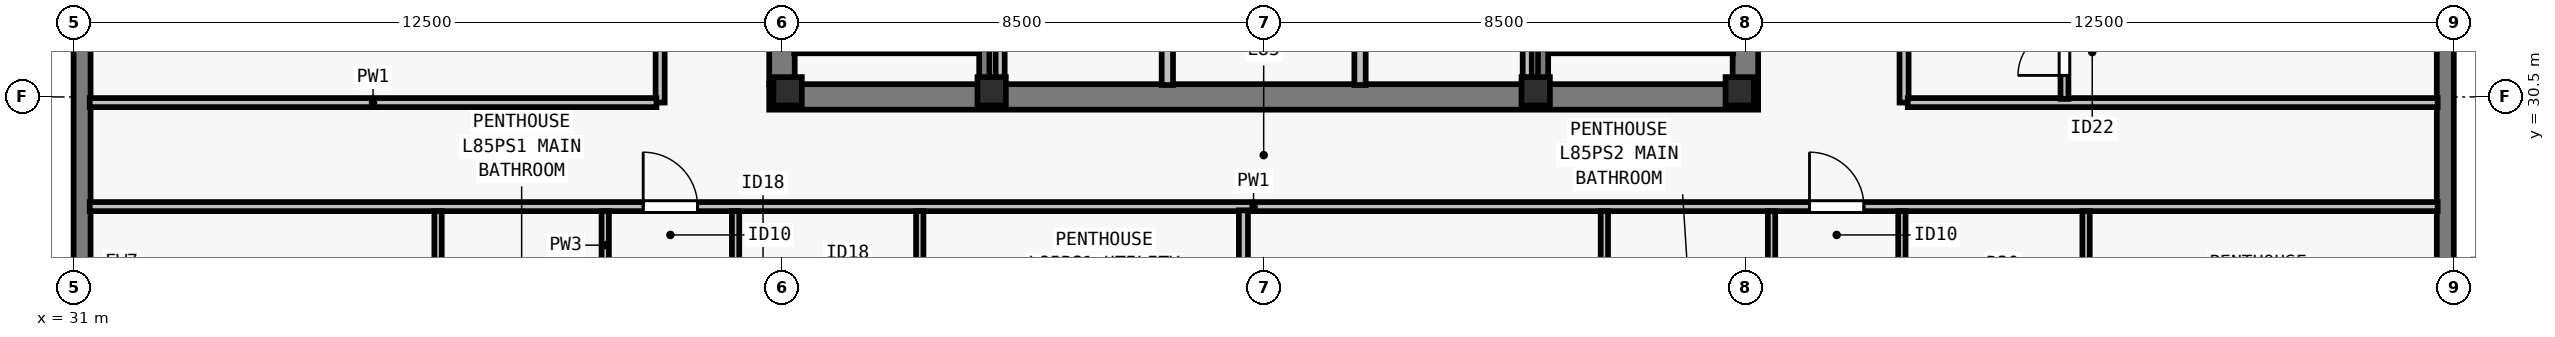
"""IFC4 building model, lengths in metres.
Left out: names, types, materials, properties, quantities, classifications, styles, units other than length and angle.
Written with IfcOpenShell. Run it as: python <this file> out.ifc"""

import sys

from ifc_helpers import new_model, si_unit, direction, frame, frame_2d, origin, origin_2d, place, context, subcontext, project, spatial, rectangle, i_section, extrude, element, fill, save


model = new_model("IFC4")
c1 = context("Model", 3, precision=1e-05, world=origin(), true_north=direction((0.0, 1.0)))
c2 = subcontext(c1, "Body", "Model", "MODEL_VIEW")
j1 = project(units=[si_unit("LENGTHUNIT", "METRE"), si_unit("PLANEANGLEUNIT", "RADIAN")], contexts=[c1])
p1 = place(None, origin())
s1 = spatial("IfcSite", under=j1, at=p1, CompositionType="ELEMENT")
p2 = place(p1, origin())
s2 = spatial("IfcBuilding", under=s1, at=p2, CompositionType="ELEMENT")
p3 = place(p2, frame((0.0, 0.0, 308.5)))
s3 = spatial("IfcBuildingStorey", under=s2, at=p3, CompositionType="ELEMENT", Elevation=308.5)
for number, where, z_axis, x_axis in (
    (1, (43.6, 30.6, 0.0), (0.0, 0.0, 1.0), (1.0, 0.0, 0.0)),
    (2, (47.2, 30.6, 0.0), (0.0, 0.0, 1.0), (1.0, 0.0, 0.0)),
    (3, (56.8, 30.6, 0.0), (0.0, 0.0, 1.0), (1.0, 0.0, 0.0)),
    (4, (60.4, 30.6, 0.0), (0.0, 0.0, 1.0), (1.0, 0.0, 0.0)),
):
    element("IfcColumn", number, at=place(p3, frame(where, z_axis=z_axis, x_axis=x_axis)), inside=s3, PredefinedType="COLUMN", context=c2, shape_type="SweptSolid", body=[
        extrude(i_section(OverallWidth=0.5, OverallDepth=0.5, WebThickness=0.028, FlangeThickness=0.045, at=origin_2d()), origin(), (0.0, 0.0, 1.0), 3.5),
    ])
p4 = place(p3, frame((72.85, 36.4, 0.0), z_axis=(0.0, 0.0, 1.0), x_axis=(0.0, -1.0, 0.0)))
e5 = element("IfcWall", 5, at=p4, inside=s3, PredefinedType="SOLIDWALL", context=c2, shape_type="SweptSolid", body=[
    extrude(rectangle(XDim=12.622, YDim=0.3, at=frame_2d((6.311, 0.0))), origin(), (0.0, 0.0, 1.0), 3.29),
])
p5 = place(p4, frame((2.98, 0.0, 0.8)))
e6 = element("IfcOpeningElement", 6, at=p5, cuts=e5, PredefinedType="OPENING", context=c2, shape_type="SweptSolid", body=[
    extrude(rectangle(XDim=2.0, YDim=1.758, at=frame_2d((1.0, 0.879))), frame((0.0, 0.16, 0.0), z_axis=(0.0, -1.0, 0.0), x_axis=(1.0, 0.0, 0.0)), (0.0, 0.0, 1.0), 0.32),
])
p6 = place(p3, frame((31.15, 23.5, 0.0), z_axis=(0.0, 0.0, 1.0), x_axis=(0.0, 1.0, 0.0)))
e7 = element("IfcWall", 7, at=p6, inside=s3, PredefinedType="SOLIDWALL", context=c2, shape_type="SweptSolid", body=[
    extrude(rectangle(XDim=30.722, YDim=0.3, at=frame_2d((15.361, 0.0))), origin(), (0.0, 0.0, 1.0), 3.29),
])
p7 = place(p6, frame((8.331, 0.0, 0.8)))
e8 = element("IfcOpeningElement", 8, at=p7, cuts=e7, PredefinedType="OPENING", context=c2, shape_type="SweptSolid", body=[
    extrude(rectangle(XDim=1.65, YDim=1.758, at=frame_2d((0.825, 0.879))), frame((0.0, 0.16, 0.0), z_axis=(0.0, -1.0, 0.0), x_axis=(1.0, 0.0, 0.0)), (0.0, 0.0, 1.0), 0.32),
])
p8 = place(p6, frame((12.442, 0.0, 0.8)))
e9 = element("IfcOpeningElement", 9, at=p8, cuts=e7, PredefinedType="OPENING", context=c2, shape_type="SweptSolid", body=[
    extrude(rectangle(XDim=2.0, YDim=1.758, at=frame_2d((1.0, 0.879))), frame((0.0, 0.16, 0.0), z_axis=(0.0, -1.0, 0.0), x_axis=(1.0, 0.0, 0.0)), (0.0, 0.0, 1.0), 0.32),
])
p9 = place(p6, frame((16.455, 0.0, 0.8)))
e10 = element("IfcOpeningElement", 10, at=p9, cuts=e7, PredefinedType="OPENING", context=c2, shape_type="SweptSolid", body=[
    extrude(rectangle(XDim=1.65, YDim=1.758, at=frame_2d((0.825, 0.879))), frame((0.0, 0.16, 0.0), z_axis=(0.0, -1.0, 0.0), x_axis=(1.0, 0.0, 0.0)), (0.0, 0.0, 1.0), 0.32),
])
p10 = place(p6, frame((20.967, 0.0, 0.8)))
e11 = element("IfcOpeningElement", 11, at=p10, cuts=e7, PredefinedType="OPENING", context=c2, shape_type="SweptSolid", body=[
    extrude(rectangle(XDim=2.0, YDim=1.758, at=frame_2d((1.0, 0.879))), frame((0.0, 0.16, 0.0), z_axis=(0.0, -1.0, 0.0), x_axis=(1.0, 0.0, 0.0)), (0.0, 0.0, 1.0), 0.32),
])
p11 = place(p3, frame((43.275, 30.5, 0.0), z_axis=(0.0, 0.0, 1.0), x_axis=(1.0, 0.0, 0.0)))
e12 = element("IfcWall", 12, at=p11, inside=s3, PredefinedType="SHEAR", context=c2, shape_type="SweptSolid", body=[
    extrude(rectangle(XDim=17.45, YDim=0.45, at=frame_2d((8.725, 0.0))), origin(), (0.0, 0.0, 1.0), 3.29),
])
for number, where, z_axis, x_axis in (
    (13, (43.5, 30.715, 0.0), (0.0, 0.0, 1.0), (0.0, 1.0, 0.0)),
    (14, (60.5, 30.715, 0.0), (0.0, 0.0, 1.0), (0.0, 1.0, 0.0)),
):
    element("IfcWall", number, at=place(p3, frame(where, z_axis=z_axis, x_axis=x_axis)), inside=s3, PredefinedType="SHEAR", context=c2, shape_type="SweptSolid", body=[
        extrude(rectangle(XDim=8.035, YDim=0.45, at=frame_2d((4.018, 0.0))), origin(), (0.0, 0.0, 1.0), 3.29),
    ])
p12 = place(p3, frame((50.3, 30.71, 0.0), z_axis=(0.0, 0.0, 1.0), x_axis=(0.0, 1.0, 0.0)))
e15 = element("IfcWall", 15, at=p12, inside=s3, PredefinedType="SOLIDWALL", context=c2, shape_type="SweptSolid", body=[
    extrude(rectangle(XDim=7.905, YDim=0.2, at=frame_2d((3.953, 0.0))), origin(), (0.0, 0.0, 1.0), 3.29),
])
p13 = place(p12, frame((3.34, 0.0, 0.0)))
e16 = element("IfcOpeningElement", 16, at=p13, cuts=e15, PredefinedType="OPENING", context=c2, shape_type="SweptSolid", body=[
    extrude(rectangle(XDim=0.9, YDim=2.12, at=frame_2d((0.45, 1.06))), frame((0.0, 0.11, 0.0), z_axis=(0.0, -1.0, 0.0), x_axis=(1.0, 0.0, 0.0)), (0.0, 0.0, 1.0), 0.22),
])
p14 = place(p3, frame((53.7, 30.71, 0.0), z_axis=(0.0, 0.0, 1.0), x_axis=(0.0, 1.0, 0.0)))
e17 = element("IfcWall", 17, at=p14, inside=s3, PredefinedType="SOLIDWALL", context=c2, shape_type="SweptSolid", body=[
    extrude(rectangle(XDim=7.905, YDim=0.2, at=frame_2d((3.953, 0.0))), origin(), (0.0, 0.0, 1.0), 3.29),
])
p15 = place(p14, frame((3.14, 0.0, 0.0)))
e18 = element("IfcOpeningElement", 18, at=p15, cuts=e17, PredefinedType="OPENING", context=c2, shape_type="SweptSolid", body=[
    extrude(rectangle(XDim=0.9, YDim=2.12, at=frame_2d((0.45, 1.06))), frame((0.0, 0.11, 0.0), z_axis=(0.0, -1.0, 0.0), x_axis=(1.0, 0.0, 0.0)), (0.0, 0.0, 1.0), 0.22),
])
for number, where, z_axis, x_axis in (
    (19, (47.35, 30.71, 0.0), (0.0, 0.0, 1.0), (0.0, 1.0, 0.0)),
    (20, (56.65, 30.71, 0.0), (0.0, 0.0, 1.0), (0.0, 1.0, 0.0)),
):
    element("IfcWall", number, at=place(p3, frame(where, z_axis=z_axis, x_axis=x_axis)), inside=s3, PredefinedType="PARTITIONING", context=c2, shape_type="SweptSolid", body=[
        extrude(rectangle(XDim=7.905, YDim=0.16, at=frame_2d((3.953, 0.0))), origin(), (0.0, 0.0, 1.0), 3.29),
    ])
p16 = place(p3, frame((31.285, 28.565, 0.0), z_axis=(0.0, 0.0, 1.0), x_axis=(1.0, 0.0, 0.0)))
e21 = element("IfcWall", 21, at=p16, inside=s3, PredefinedType="PARTITIONING", context=c2, shape_type="SweptSolid", body=[
    extrude(rectangle(XDim=41.43, YDim=0.16, at=frame_2d((20.715, 0.0))), origin(), (0.0, 0.0, 1.0), 3.009),
])
p17 = place(p16, frame((9.766, 0.0, 0.0)))
e22 = element("IfcOpeningElement", 22, at=p17, cuts=e21, PredefinedType="OPENING", context=c2, shape_type="SweptSolid", body=[
    extrude(rectangle(XDim=0.96, YDim=2.18, at=frame_2d((0.48, 1.09))), frame((0.0, 0.09, 0.0), z_axis=(0.0, -1.0, 0.0), x_axis=(1.0, 0.0, 0.0)), (0.0, 0.0, 1.0), 0.18),
])
p18 = place(p16, frame((30.346, 0.0, 0.0)))
e23 = element("IfcOpeningElement", 23, at=p18, cuts=e21, PredefinedType="OPENING", context=c2, shape_type="SweptSolid", body=[
    extrude(rectangle(XDim=0.96, YDim=2.18, at=frame_2d((0.48, 1.09))), frame((0.0, 0.09, 0.0), z_axis=(0.0, -1.0, 0.0), x_axis=(1.0, 0.0, 0.0)), (0.0, 0.0, 1.0), 0.18),
])
p19 = place(p3, frame((41.35, 30.4, 0.0), z_axis=(0.0, 0.0, 1.0), x_axis=(0.0, 1.0, 0.0)))
e24 = element("IfcWall", 24, at=p19, inside=s3, PredefinedType="PARTITIONING", context=c2, shape_type="SweptSolid", body=[
    extrude(rectangle(XDim=17.2, YDim=0.16, at=frame_2d((8.6, 0.0))), origin(), (0.0, 0.0, 1.0), 3.009),
])
p20 = place(p19, frame((8.0, 0.0, 0.0)))
e25 = element("IfcOpeningElement", 25, at=p20, cuts=e24, PredefinedType="OPENING", context=c2, shape_type="SweptSolid", body=[
    extrude(rectangle(XDim=0.96, YDim=2.12, at=frame_2d((0.48, 1.06))), frame((0.0, 0.09, 0.0), z_axis=(0.0, -1.0, 0.0), x_axis=(1.0, 0.0, 0.0)), (0.0, 0.0, 1.0), 0.18),
])
p21 = place(p3, frame((63.3, 30.4, 0.0), z_axis=(0.0, 0.0, 1.0), x_axis=(0.0, 1.0, 0.0)))
e26 = element("IfcWall", 26, at=p21, inside=s3, PredefinedType="PARTITIONING", context=c2, shape_type="SweptSolid", body=[
    extrude(rectangle(XDim=17.2, YDim=0.16, at=frame_2d((8.6, 0.0))), origin(), (0.0, 0.0, 1.0), 3.29),
])
p22 = place(p21, frame((8.12, 0.0, 0.0)))
e27 = element("IfcOpeningElement", 27, at=p22, cuts=e26, PredefinedType="OPENING", context=c2, shape_type="SweptSolid", body=[
    extrude(rectangle(XDim=0.96, YDim=2.18, at=frame_2d((0.48, 1.09))), frame((0.0, 0.09, 0.0), z_axis=(0.0, -1.0, 0.0), x_axis=(1.0, 0.0, 0.0)), (0.0, 0.0, 1.0), 0.18),
])
p23 = place(p3, frame((31.285, 30.4, 0.0), z_axis=(0.0, 0.0, 1.0), x_axis=(1.0, 0.0, 0.0)))
e28 = element("IfcWall", 28, at=p23, inside=s3, PredefinedType="PARTITIONING", context=c2, shape_type="SweptSolid", body=[
    extrude(rectangle(XDim=10.0, YDim=0.16, at=frame_2d((5.0, 0.0))), origin(), (0.0, 0.0, 1.0), 3.29),
])
p24 = place(p3, frame((63.365, 30.4, 0.0), z_axis=(0.0, 0.0, 1.0), x_axis=(1.0, 0.0, 0.0)))
e29 = element("IfcWall", 29, at=p24, inside=s3, PredefinedType="PARTITIONING", context=c2, shape_type="SweptSolid", body=[
    extrude(rectangle(XDim=9.35, YDim=0.16, at=frame_2d((4.675, 0.0))), origin(), (0.0, 0.0, 1.0), 3.29),
])
p25 = place(p3, frame((37.431, 25.735, 0.0), z_axis=(0.0, 0.0, 1.0), x_axis=(0.0, 1.0, 0.0)))
e30 = element("IfcWall", 30, at=p25, inside=s3, PredefinedType="PLUMBINGWALL", context=c2, shape_type="SweptSolid", body=[
    extrude(rectangle(XDim=2.75, YDim=0.13, at=frame_2d((1.375, 0.0))), origin(), (0.0, 0.0, 1.0), 3.29),
])
p26 = place(p3, frame((40.381, 25.735, 0.0), z_axis=(0.0, 0.0, 1.0), x_axis=(0.0, 1.0, 0.0)))
e31 = element("IfcWall", 31, at=p26, inside=s3, PredefinedType="PLUMBINGWALL", context=c2, shape_type="SweptSolid", body=[
    extrude(rectangle(XDim=2.75, YDim=0.13, at=frame_2d((1.375, 0.0))), origin(), (0.0, 0.0, 1.0), 3.29),
])
p27 = place(p26, frame((0.55, 0.0, 0.0)))
e32 = element("IfcOpeningElement", 32, at=p27, cuts=e31, PredefinedType="OPENING", context=c2, shape_type="SweptSolid", body=[
    extrude(rectangle(XDim=0.85, YDim=2.08, at=frame_2d((0.425, 1.04))), frame((0.0, 0.075, 0.0), z_axis=(0.0, -1.0, 0.0), x_axis=(1.0, 0.0, 0.0)), (0.0, 0.0, 1.0), 0.15),
])
p28 = place(p3, frame((45.931, 25.735, 0.0), z_axis=(0.0, 0.0, 1.0), x_axis=(0.0, 1.0, 0.0)))
e33 = element("IfcWall", 33, at=p28, inside=s3, PredefinedType="PLUMBINGWALL", context=c2, shape_type="SweptSolid", body=[
    extrude(rectangle(XDim=2.75, YDim=0.13, at=frame_2d((1.375, 0.0))), origin(), (0.0, 0.0, 1.0), 3.29),
])
p29 = place(p3, frame((42.681, 25.735, 0.0), z_axis=(0.0, 0.0, 1.0), x_axis=(0.0, 1.0, 0.0)))
e34 = element("IfcWall", 34, at=p29, inside=s3, PredefinedType="PLUMBINGWALL", context=c2, shape_type="SweptSolid", body=[
    extrude(rectangle(XDim=2.75, YDim=0.13, at=frame_2d((1.375, 0.0))), origin(), (0.0, 0.0, 1.0), 3.29),
])
p30 = place(p29, frame((0.55, 0.0, 0.0)))
e35 = element("IfcOpeningElement", 35, at=p30, cuts=e34, PredefinedType="OPENING", context=c2, shape_type="SweptSolid", body=[
    extrude(rectangle(XDim=0.88, YDim=2.1, at=frame_2d((0.44, 1.05))), frame((0.0, 0.075, 0.0), z_axis=(0.0, -1.0, 0.0), x_axis=(1.0, 0.0, 0.0)), (0.0, 0.0, 1.0), 0.15),
])
p31 = place(p3, frame((51.643, 18.285, 0.0), z_axis=(0.0, 0.0, 1.0), x_axis=(0.0, 1.0, 0.0)))
e36 = element("IfcWall", 36, at=p31, inside=s3, PredefinedType="PARTITIONING", context=c2, shape_type="SweptSolid", body=[
    extrude(rectangle(XDim=10.215, YDim=0.16, at=frame_2d((5.107, 0.0))), origin(), (0.0, 0.0, 1.0), 3.009),
])
p32 = place(p3, frame((58.011, 25.735, 0.0), z_axis=(0.0, 0.0, 1.0), x_axis=(0.0, 1.0, 0.0)))
e37 = element("IfcWall", 37, at=p32, inside=s3, PredefinedType="PLUMBINGWALL", context=c2, shape_type="SweptSolid", body=[
    extrude(rectangle(XDim=2.75, YDim=0.13, at=frame_2d((1.375, 0.0))), origin(), (0.0, 0.0, 1.0), 3.29),
])
p33 = place(p3, frame((60.961, 25.735, 0.0), z_axis=(0.0, 0.0, 1.0), x_axis=(0.0, 1.0, 0.0)))
e38 = element("IfcWall", 38, at=p33, inside=s3, PredefinedType="PLUMBINGWALL", context=c2, shape_type="SweptSolid", body=[
    extrude(rectangle(XDim=2.75, YDim=0.13, at=frame_2d((1.375, 0.0))), origin(), (0.0, 0.0, 1.0), 3.29),
])
p34 = place(p33, frame((0.55, 0.0, 0.0)))
e39 = element("IfcOpeningElement", 39, at=p34, cuts=e38, PredefinedType="OPENING", context=c2, shape_type="SweptSolid", body=[
    extrude(rectangle(XDim=0.85, YDim=2.08, at=frame_2d((0.425, 1.04))), frame((0.0, 0.075, 0.0), z_axis=(0.0, -1.0, 0.0), x_axis=(1.0, 0.0, 0.0)), (0.0, 0.0, 1.0), 0.15),
])
p35 = place(p3, frame((66.511, 25.735, 0.0), z_axis=(0.0, 0.0, 1.0), x_axis=(0.0, 1.0, 0.0)))
e40 = element("IfcWall", 40, at=p35, inside=s3, PredefinedType="PLUMBINGWALL", context=c2, shape_type="SweptSolid", body=[
    extrude(rectangle(XDim=2.75, YDim=0.13, at=frame_2d((1.375, 0.0))), origin(), (0.0, 0.0, 1.0), 3.29),
])
p36 = place(p3, frame((63.261, 25.735, 0.0), z_axis=(0.0, 0.0, 1.0), x_axis=(0.0, 1.0, 0.0)))
e41 = element("IfcWall", 41, at=p36, inside=s3, PredefinedType="PLUMBINGWALL", context=c2, shape_type="SweptSolid", body=[
    extrude(rectangle(XDim=2.75, YDim=0.13, at=frame_2d((1.375, 0.0))), origin(), (0.0, 0.0, 1.0), 3.29),
])
p37 = place(p36, frame((0.55, 0.0, 0.0)))
e42 = element("IfcOpeningElement", 42, at=p37, cuts=e41, PredefinedType="OPENING", context=c2, shape_type="SweptSolid", body=[
    extrude(rectangle(XDim=0.88, YDim=2.1, at=frame_2d((0.44, 1.05))), frame((0.0, 0.075, 0.0), z_axis=(0.0, -1.0, 0.0), x_axis=(1.0, 0.0, 0.0)), (0.0, 0.0, 1.0), 0.15),
])
p38 = place(p3, frame((66.13, 30.465, 0.0), z_axis=(0.0, 0.0, 1.0), x_axis=(0.0, 1.0, 0.0)))
e43 = element("IfcWall", 43, at=p38, inside=s3, PredefinedType="PARTITIONING", context=c2, shape_type="SweptSolid", body=[
    extrude(rectangle(XDim=4.16, YDim=0.14, at=frame_2d((2.08, 0.0))), origin(), (0.0, 0.0, 1.0), 3.29),
])
p39 = place(p38, frame((0.415, 0.0, 0.0)))
e44 = element("IfcOpeningElement", 44, at=p39, cuts=e43, PredefinedType="OPENING", context=c2, shape_type="SweptSolid", body=[
    extrude(rectangle(XDim=0.82, YDim=2.1, at=frame_2d((0.41, 1.05))), frame((0.0, 0.08, 0.0), z_axis=(0.0, -1.0, 0.0), x_axis=(1.0, 0.0, 0.0)), (0.0, 0.0, 1.0), 0.16),
])
p40 = place(p3, frame((43.715, 31.36, 0.0), z_axis=(0.0, 0.0, 1.0), x_axis=(1.0, 0.0, 0.0)))
e45 = element("IfcWall", 45, at=p40, inside=s3, PredefinedType="SOLIDWALL", context=c2, shape_type="SweptSolid", body=[
    extrude(rectangle(XDim=3.28, YDim=0.18, at=frame_2d((1.64, 0.0))), origin(), (0.0, 0.0, 1.0), 3.29),
])
p41 = place(p3, frame((47.07, 38.78, 0.0), z_axis=(0.0, 0.0, 1.0), x_axis=(0.0, -1.0, 0.0)))
e46 = element("IfcWall", 46, at=p41, inside=s3, PredefinedType="SOLIDWALL", context=c2, shape_type="SweptSolid", body=[
    extrude(rectangle(XDim=8.067, YDim=0.18, at=frame_2d((4.034, 0.0))), origin(), (0.0, 0.0, 1.0), 3.29),
])
p42 = place(p3, frame((57.005, 31.36, 0.0), z_axis=(0.0, 0.0, 1.0), x_axis=(1.0, 0.0, 0.0)))
e47 = element("IfcWall", 47, at=p42, inside=s3, PredefinedType="SOLIDWALL", context=c2, shape_type="SweptSolid", body=[
    extrude(rectangle(XDim=3.28, YDim=0.18, at=frame_2d((1.64, 0.0))), origin(), (0.0, 0.0, 1.0), 3.29),
])
p43 = place(p3, frame((56.93, 38.78, 0.0), z_axis=(0.0, 0.0, 1.0), x_axis=(0.0, -1.0, 0.0)))
e48 = element("IfcWall", 48, at=p43, inside=s3, PredefinedType="SOLIDWALL", context=c2, shape_type="SweptSolid", body=[
    extrude(rectangle(XDim=8.067, YDim=0.18, at=frame_2d((4.034, 0.0))), origin(), (0.0, 0.0, 1.0), 3.29),
])
p44 = place(p17, origin())
e49 = element("IfcDoor", 49, at=p44, inside=s3, OperationType="SINGLE_SWING_LEFT", PredefinedType="DOOR", context=c2, shape_type="SweptSolid", body=[
    extrude(rectangle(XDim=0.96, YDim=2.18, at=frame_2d((0.48, 1.09))), frame((0.0, 0.025, 0.0), z_axis=(0.0, -1.0, 0.0), x_axis=(1.0, 0.0, 0.0)), (0.0, 0.0, 1.0), 0.05),
])
fill(e22, e49)
p45 = place(p18, origin())
e50 = element("IfcDoor", 50, at=p45, inside=s3, OperationType="SINGLE_SWING_LEFT", PredefinedType="DOOR", context=c2, shape_type="SweptSolid", body=[
    extrude(rectangle(XDim=0.96, YDim=2.18, at=frame_2d((0.48, 1.09))), frame((0.0, 0.025, 0.0), z_axis=(0.0, -1.0, 0.0), x_axis=(1.0, 0.0, 0.0)), (0.0, 0.0, 1.0), 0.05),
])
fill(e23, e50)
p46 = place(p39, origin())
e51 = element("IfcDoor", 51, at=p46, inside=s3, OperationType="SINGLE_SWING_LEFT", PredefinedType="DOOR", context=c2, shape_type="SweptSolid", body=[
    extrude(rectangle(XDim=0.82, YDim=2.1, at=frame_2d((0.41, 1.05))), frame((0.0, 0.025, 0.0), z_axis=(0.0, -1.0, 0.0), x_axis=(1.0, 0.0, 0.0)), (0.0, 0.0, 1.0), 0.05),
])
fill(e44, e51)
save(model, sys.argv[1])
